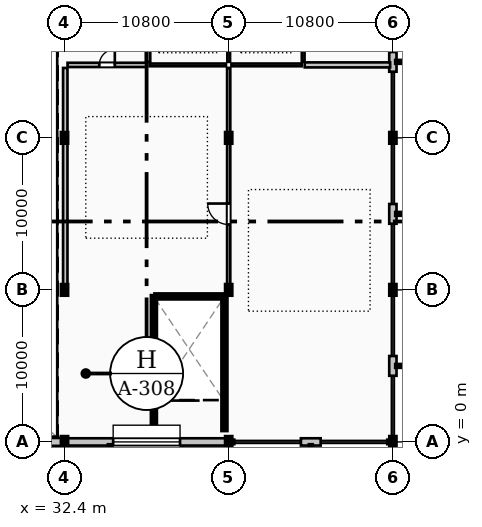
"""IFC4 building model, lengths in metres.
Left out: names, types, materials, properties, quantities, classifications, styles, units other than length and angle.
Written with IfcOpenShell. Run it as: python <this file> out.ifc"""

import sys

from ifc_helpers import new_model, si_unit, direction, frame, frame_2d, origin, origin_2d, place, context, subcontext, project, spatial, rectangle, i_section, extrude, element, fill, save


model = new_model("IFC4")
c1 = context("Model", 3, precision=1e-05, world=origin(), true_north=direction((0.0, 1.0)))
c2 = subcontext(c1, "Body", "Model", "MODEL_VIEW")
j1 = project(units=[si_unit("LENGTHUNIT", "METRE"), si_unit("PLANEANGLEUNIT", "RADIAN")], contexts=[c1])
p1 = place(None, origin())
s1 = spatial("IfcSite", under=j1, at=p1, CompositionType="ELEMENT")
p2 = place(p1, origin())
s2 = spatial("IfcBuilding", under=s1, at=p2, CompositionType="ELEMENT")
p3 = place(p2, frame((0.0, 0.0, 4.8)))
s3 = spatial("IfcBuildingStorey", under=s2, at=p3, CompositionType="ELEMENT", Elevation=4.8)
for number, where, z_axis, x_axis in (
    (1, (32.4, 0.0, 0.0), (0.0, 0.0, 1.0), (1.0, 0.0, 0.0)),
    (2, (32.4, 10.0, 0.0), (0.0, 0.0, 1.0), (1.0, 0.0, 0.0)),
    (3, (32.4, 20.0, 0.0), (0.0, 0.0, 1.0), (1.0, 0.0, 0.0)),
    (4, (43.2, 0.0, 0.0), (0.0, 0.0, 1.0), (1.0, 0.0, 0.0)),
    (5, (43.2, 10.0, 0.0), (0.0, 0.0, 1.0), (1.0, 0.0, 0.0)),
    (6, (43.2, 20.0, 0.0), (0.0, 0.0, 1.0), (1.0, 0.0, 0.0)),
    (7, (54.0, 0.0, 0.0), (0.0, 0.0, 1.0), (1.0, 0.0, 0.0)),
    (8, (54.0, 10.0, 0.0), (0.0, 0.0, 1.0), (1.0, 0.0, 0.0)),
    (9, (54.0, 20.0, 0.0), (0.0, 0.0, 1.0), (1.0, 0.0, 0.0)),
):
    element("IfcColumn", number, at=place(p3, frame(where, z_axis=z_axis, x_axis=x_axis)), inside=s3, PredefinedType="COLUMN", context=c2, shape_type="SweptSolid", body=[
        extrude(i_section(OverallWidth=0.3, OverallDepth=0.59, WebThickness=0.013, FlangeThickness=0.025, FilletRadius=0.027, at=origin_2d()), origin(), (0.0, 0.0, 1.0), 4.8),
    ])
p4 = place(p3, frame((21.745, 0.0, 0.0), z_axis=(0.0, 0.0, 1.0), x_axis=(1.0, 0.0, 0.0)))
e10 = element("IfcWall", 10, at=p4, inside=s3, PredefinedType="SOLIDWALL", context=c2, shape_type="SweptSolid", body=[
    extrude(rectangle(XDim=10.51, YDim=0.52, at=frame_2d((5.255, 0.0))), origin(), (0.0, 0.0, 1.0), 3.899),
])
p5 = place(p3, frame((32.545, 0.0, 0.0), z_axis=(0.0, 0.0, 1.0), x_axis=(1.0, 0.0, 0.0)))
e11 = element("IfcWall", 11, at=p5, inside=s3, PredefinedType="STANDARD", context=c2, shape_type="SweptSolid", body=[
    extrude(rectangle(XDim=10.51, YDim=0.48, at=frame_2d((5.255, 0.0))), origin(), (0.0, 0.0, 1.0), 4.059),
])
p6 = place(p5, frame((3.055, 0.0, 1.0)))
e12 = element("IfcOpeningElement", 12, at=p6, cuts=e11, PredefinedType="OPENING", context=c2, shape_type="SweptSolid", body=[
    extrude(rectangle(XDim=4.4, YDim=1.8, at=frame_2d((2.2, 0.9))), frame((0.0, 0.25, 0.0), z_axis=(0.0, -1.0, 0.0), x_axis=(1.0, 0.0, 0.0)), (0.0, 0.0, 1.0), 0.5),
])
p7 = place(p3, frame((47.95, 0.0, 0.0), z_axis=(0.0, 0.0, 1.0), x_axis=(1.0, 0.0, 0.0)))
e13 = element("IfcWall", 13, at=p7, inside=s3, PredefinedType="STANDARD", context=c2, shape_type="SweptSolid", body=[
    extrude(rectangle(XDim=1.3, YDim=0.48, at=frame_2d((0.65, 0.0))), origin(), (0.0, 0.0, 1.0), 4.059),
])
for number, where, z_axis, x_axis in (
    (14, (43.345, 0.0, 0.0), (0.0, 0.0, 1.0), (1.0, 0.0, 0.0)),
    (15, (53.63, 0.0, 0.0), (0.0, 0.0, 1.0), (1.0, 0.0, 0.0)),
):
    element("IfcWall", number, at=place(p3, frame(where, z_axis=z_axis, x_axis=x_axis)), inside=s3, PredefinedType="STANDARD", context=c2, shape_type="SweptSolid", body=[
        extrude(rectangle(XDim=0.225, YDim=0.3, at=frame_2d((0.113, 0.0))), origin(), (0.0, 0.0, 1.0), 4.56),
    ])
p8 = place(p3, frame((54.0, 4.35, 0.0), z_axis=(0.0, 0.0, 1.0), x_axis=(0.0, 1.0, 0.0)))
e16 = element("IfcWall", 16, at=p8, inside=s3, PredefinedType="STANDARD", context=c2, shape_type="SweptSolid", body=[
    extrude(rectangle(XDim=1.3, YDim=0.48, at=frame_2d((0.65, 0.0))), origin(), (0.0, 0.0, 1.0), 4.56),
])
for number, where, z_axis, x_axis in (
    (17, (54.0, 0.145, 0.0), (0.0, 0.0, 1.0), (0.0, 1.0, 0.0)),
    (18, (54.0, 9.63, 0.0), (0.0, 0.0, 1.0), (0.0, 1.0, 0.0)),
):
    element("IfcWall", number, at=place(p3, frame(where, z_axis=z_axis, x_axis=x_axis)), inside=s3, PredefinedType="STANDARD", context=c2, shape_type="SweptSolid", body=[
        extrude(rectangle(XDim=0.225, YDim=0.3, at=frame_2d((0.113, 0.0))), origin(), (0.0, 0.0, 1.0), 4.56),
    ])
p9 = place(p3, frame((54.0, 14.35, 0.0), z_axis=(0.0, 0.0, 1.0), x_axis=(0.0, 1.0, 0.0)))
e19 = element("IfcWall", 19, at=p9, inside=s3, PredefinedType="STANDARD", context=c2, shape_type="SweptSolid", body=[
    extrude(rectangle(XDim=1.3, YDim=0.48, at=frame_2d((0.65, 0.0))), origin(), (0.0, 0.0, 1.0), 4.56),
])
for number, where, z_axis, x_axis in (
    (20, (54.0, 10.145, 0.0), (0.0, 0.0, 1.0), (0.0, 1.0, 0.0)),
    (21, (54.0, 19.63, 0.0), (0.0, 0.0, 1.0), (0.0, 1.0, 0.0)),
):
    element("IfcWall", number, at=place(p3, frame(where, z_axis=z_axis, x_axis=x_axis)), inside=s3, PredefinedType="STANDARD", context=c2, shape_type="SweptSolid", body=[
        extrude(rectangle(XDim=0.225, YDim=0.3, at=frame_2d((0.113, 0.0))), origin(), (0.0, 0.0, 1.0), 4.56),
    ])
p10 = place(p3, frame((54.0, 24.35, 0.0), z_axis=(0.0, 0.0, 1.0), x_axis=(0.0, 1.0, 0.0)))
e22 = element("IfcWall", 22, at=p10, inside=s3, PredefinedType="STANDARD", context=c2, shape_type="SweptSolid", body=[
    extrude(rectangle(XDim=1.3, YDim=0.48, at=frame_2d((0.65, 0.0))), origin(), (0.0, 0.0, 1.0), 4.56),
])
p11 = place(p3, frame((54.0, 20.145, 0.0), z_axis=(0.0, 0.0, 1.0), x_axis=(0.0, 1.0, 0.0)))
e23 = element("IfcWall", 23, at=p11, inside=s3, PredefinedType="STANDARD", context=c2, shape_type="SweptSolid", body=[
    extrude(rectangle(XDim=0.225, YDim=0.3, at=frame_2d((0.113, 0.0))), origin(), (0.0, 0.0, 1.0), 4.56),
])
for number, where, z_axis, x_axis in (
    (24, (38.28, 0.8, 0.0), (0.0, 0.0, 1.0), (0.0, 1.0, 0.0)),
    (25, (42.92, 0.8, 0.0), (0.0, 0.0, 1.0), (0.0, 1.0, 0.0)),
):
    element("IfcWall", number, at=place(p3, frame(where, z_axis=z_axis, x_axis=x_axis)), inside=s3, PredefinedType="SHEAR", context=c2, shape_type="SweptSolid", body=[
        extrude(rectangle(XDim=8.77, YDim=0.22, at=frame_2d((4.385, 0.0))), origin(), (0.0, 0.0, 1.0), 4.56),
    ])
p12 = place(p3, frame((38.4, 9.57, 0.0), z_axis=(0.0, 0.0, 1.0), x_axis=(1.0, 0.0, 0.0)))
e26 = element("IfcWall", 26, at=p12, inside=s3, PredefinedType="SHEAR", context=c2, shape_type="SweptSolid", body=[
    extrude(rectangle(XDim=4.4, YDim=0.22, at=frame_2d((2.2, 0.0))), origin(), (0.0, 0.0, 1.0), 4.56),
])
p13 = place(p3, frame((32.6, 24.8, 0.0), z_axis=(0.0, 0.0, 1.0), x_axis=(1.0, 0.0, 0.0)))
e27 = element("IfcWall", 27, at=p13, inside=s3, PredefinedType="SOLIDWALL", context=c2, shape_type="SweptSolid", body=[
    extrude(rectangle(XDim=5.2, YDim=0.28, at=frame_2d((2.6, 0.0))), origin(), (0.0, 0.0, 1.0), 4.52),
])
p14 = place(p13, frame((2.09, 0.0, 0.0)))
e28 = element("IfcOpeningElement", 28, at=p14, cuts=e27, PredefinedType="OPENING", context=c2, shape_type="SweptSolid", body=[
    extrude(rectangle(XDim=1.02, YDim=2.15, at=frame_2d((0.51, 1.075))), frame((0.0, 0.15, 0.0), z_axis=(0.0, -1.0, 0.0), x_axis=(1.0, 0.0, 0.0)), (0.0, 0.0, 1.0), 0.3),
])
p15 = place(p3, frame((43.2, 10.18, 0.0), z_axis=(0.0, 0.0, 1.0), x_axis=(0.0, 1.0, 0.0)))
e29 = element("IfcWall", 29, at=p15, inside=s3, PredefinedType="PARTITIONING", context=c2, shape_type="SweptSolid", body=[
    extrude(rectangle(XDim=9.62, YDim=0.21, at=frame_2d((4.81, 0.0))), origin(), (0.0, 0.0, 1.0), 4.05),
])
p16 = place(p15, frame((4.12, 0.0, 0.0)))
e30 = element("IfcOpeningElement", 30, at=p16, cuts=e29, PredefinedType="OPENING", context=c2, shape_type="SweptSolid", body=[
    extrude(rectangle(XDim=1.38, YDim=2.38, at=frame_2d((0.69, 1.19))), frame((0.0, 0.115, 0.0), z_axis=(0.0, -1.0, 0.0), x_axis=(1.0, 0.0, 0.0)), (0.0, 0.0, 1.0), 0.23),
])
p17 = place(p3, frame((43.2, 20.2, 0.0), z_axis=(0.0, 0.0, 1.0), x_axis=(0.0, 1.0, 0.0)))
e31 = element("IfcWall", 31, at=p17, inside=s3, PredefinedType="PARTITIONING", context=c2, shape_type="SweptSolid", body=[
    extrude(rectangle(XDim=4.4, YDim=0.21, at=frame_2d((2.2, 0.0))), origin(), (0.0, 0.0, 1.0), 4.05),
])
p18 = place(p3, frame((38.0, 24.8, 0.0), z_axis=(0.0, 0.0, 1.0), x_axis=(1.0, 0.0, 0.0)))
e32 = element("IfcWall", 32, at=p18, inside=s3, PredefinedType="PLUMBINGWALL", context=c2, shape_type="SweptSolid", body=[
    extrude(rectangle(XDim=5.02, YDim=0.18, at=frame_2d((2.51, 0.0))), origin(), (0.0, 0.0, 1.0), 4.52),
])
p19 = place(p3, frame((43.38, 24.8, 0.0), z_axis=(0.0, 0.0, 1.0), x_axis=(1.0, 0.0, 0.0)))
e33 = element("IfcWall", 33, at=p19, inside=s3, PredefinedType="PLUMBINGWALL", context=c2, shape_type="SweptSolid", body=[
    extrude(rectangle(XDim=4.62, YDim=0.18, at=frame_2d((2.31, 0.0))), origin(), (0.0, 0.0, 1.0), 4.52),
])
p20 = place(p3, frame((48.2, 24.8, 0.0), z_axis=(0.0, 0.0, 1.0), x_axis=(1.0, 0.0, 0.0)))
e34 = element("IfcWall", 34, at=p20, inside=s3, PredefinedType="PARTITIONING", context=c2, shape_type="SweptSolid", body=[
    extrude(rectangle(XDim=5.62, YDim=0.33, at=frame_2d((2.81, 0.0))), origin(), (0.0, 0.0, 1.0), 4.52),
])
p21 = place(p3, frame((37.9, 25.0, 0.0), z_axis=(0.0, 0.0, 1.0), x_axis=(0.0, 1.0, 0.0)))
e35 = element("IfcWall", 35, at=p21, inside=s3, PredefinedType="SOLIDWALL", context=c2, shape_type="SweptSolid", body=[
    extrude(rectangle(XDim=5.0, YDim=0.28, at=frame_2d((2.5, 0.0))), origin(), (0.0, 0.0, 1.0), 4.52),
])
p22 = place(p3, frame((43.2, 25.0, 0.0), z_axis=(0.0, 0.0, 1.0), x_axis=(0.0, 1.0, 0.0)))
e36 = element("IfcWall", 36, at=p22, inside=s3, PredefinedType="PLUMBINGWALL", context=c2, shape_type="SweptSolid", body=[
    extrude(rectangle(XDim=5.0, YDim=0.18, at=frame_2d((2.5, 0.0))), origin(), (0.0, 0.0, 1.0), 4.05),
])
p23 = place(p3, frame((48.1, 25.0, 0.0), z_axis=(0.0, 0.0, 1.0), x_axis=(0.0, 1.0, 0.0)))
e37 = element("IfcWall", 37, at=p23, inside=s3, PredefinedType="PLUMBINGWALL", context=c2, shape_type="SweptSolid", body=[
    extrude(rectangle(XDim=5.0, YDim=0.18, at=frame_2d((2.5, 0.0))), origin(), (0.0, 0.0, 1.0), 4.52),
])
p24 = place(p3, frame((32.45, 10.18, 0.0), z_axis=(0.0, 0.0, 1.0), x_axis=(0.0, 1.0, 0.0)))
e38 = element("IfcWall", 38, at=p24, inside=s3, PredefinedType="PARTITIONING", context=c2, shape_type="SweptSolid", body=[
    extrude(rectangle(XDim=9.62, YDim=0.29, at=frame_2d((4.81, 0.0))), origin(), (0.0, 0.0, 1.0), 4.05),
])
p25 = place(p3, frame((32.45, 20.2, 0.0), z_axis=(0.0, 0.0, 1.0), x_axis=(0.0, 1.0, 0.0)))
e39 = element("IfcWall", 39, at=p25, inside=s3, PredefinedType="PARTITIONING", context=c2, shape_type="SweptSolid", body=[
    extrude(rectangle(XDim=4.4, YDim=0.29, at=frame_2d((2.2, 0.0))), origin(), (0.0, 0.0, 1.0), 4.05),
])
p26 = place(p6, origin())
e40 = element("IfcWindow", 40, at=p26, inside=s3, PartitioningType="SINGLE_PANEL", PredefinedType="WINDOW", context=c2, shape_type="SweptSolid", body=[
    extrude(rectangle(XDim=4.4, YDim=1.8, at=frame_2d((2.2, 0.9))), frame((0.0, 0.03, 0.0), z_axis=(0.0, -1.0, 0.0), x_axis=(1.0, 0.0, 0.0)), (0.0, 0.0, 1.0), 0.06),
])
fill(e12, e40)
p27 = place(p14, origin())
e41 = element("IfcDoor", 41, at=p27, inside=s3, OperationType="SINGLE_SWING_RIGHT", PredefinedType="DOOR", context=c2, shape_type="SweptSolid", body=[
    extrude(rectangle(XDim=1.02, YDim=2.15, at=frame_2d((0.51, 1.075))), frame((0.0, 0.025, 0.0), z_axis=(0.0, -1.0, 0.0), x_axis=(1.0, 0.0, 0.0)), (0.0, 0.0, 1.0), 0.05),
])
fill(e28, e41)
p28 = place(p16, origin())
e42 = element("IfcDoor", 42, at=p28, inside=s3, OperationType="SINGLE_SWING_RIGHT", PredefinedType="DOOR", context=c2, shape_type="SweptSolid", body=[
    extrude(rectangle(XDim=1.38, YDim=2.38, at=frame_2d((0.69, 1.19))), frame((0.0, 0.025, 0.0), z_axis=(0.0, -1.0, 0.0), x_axis=(1.0, 0.0, 0.0)), (0.0, 0.0, 1.0), 0.05),
])
fill(e30, e42)
save(model, sys.argv[1])
